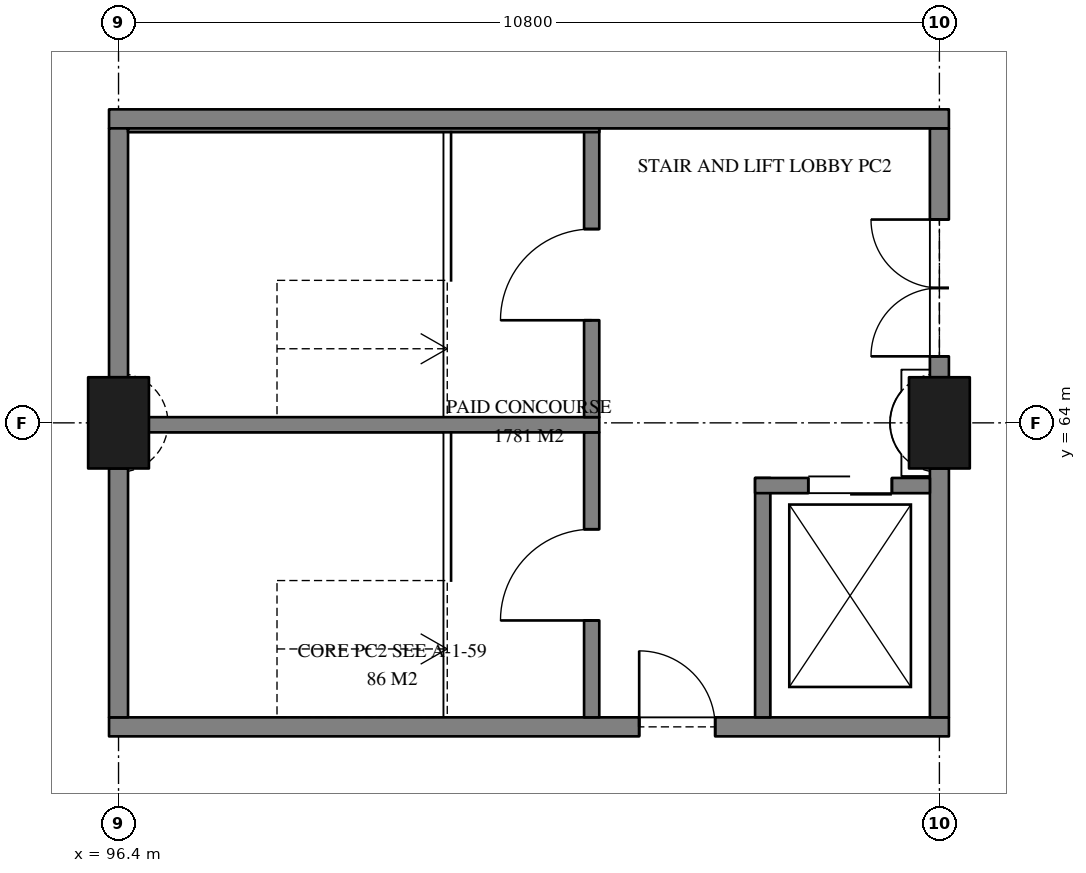
"""IFC4 building model, lengths in metres.
Left out: names, types, materials, properties, quantities, classifications, styles, units other than length and angle.
Written with IfcOpenShell. Run it as: python <this file> out.ifc"""

import sys

from ifc_helpers import new_model, si_unit, direction, frame, frame_2d, origin, origin_2d, place, context, subcontext, project, spatial, rectangle, extrude, element, fill, save


model = new_model("IFC4")
c1 = context("Model", 3, precision=1e-05, world=origin(), true_north=direction((0.0, 1.0)))
c2 = subcontext(c1, "Body", "Model", "MODEL_VIEW")
j1 = project(units=[si_unit("LENGTHUNIT", "METRE"), si_unit("PLANEANGLEUNIT", "RADIAN")], contexts=[c1])
p1 = place(None, origin())
s1 = spatial("IfcSite", under=j1, at=p1, CompositionType="ELEMENT")
p2 = place(p1, origin())
s2 = spatial("IfcBuilding", under=s1, at=p2, CompositionType="ELEMENT")
p3 = place(p2, frame((0.0, 0.0, -5.4)))
s3 = spatial("IfcBuildingStorey", under=s2, at=p3, CompositionType="ELEMENT", Elevation=-5.4)
for number, where, z_axis, x_axis in (
    (1, (96.4, 64.0, 0.0), (0.0, 0.0, 1.0), (1.0, 0.0, 0.0)),
    (2, (107.2, 64.0, 0.0), (0.0, 0.0, 1.0), (1.0, 0.0, 0.0)),
):
    element("IfcColumn", number, at=place(p3, frame(where, z_axis=z_axis, x_axis=x_axis)), inside=s3, PredefinedType="COLUMN", context=c2, shape_type="SweptSolid", body=[
        extrude(rectangle(XDim=0.8, YDim=1.2, at=origin_2d()), origin(), (0.0, 0.0, 1.0), 5.4),
    ])
p4 = place(p3, frame((96.275, 60.0, 0.0), z_axis=(0.0, 0.0, 1.0), x_axis=(1.0, 0.0, 0.0)))
e3 = element("IfcWall", 3, at=p4, inside=s3, PredefinedType="SOLIDWALL", context=c2, shape_type="SweptSolid", body=[
    extrude(rectangle(XDim=11.05, YDim=0.25, at=frame_2d((5.525, 0.0))), origin(), (0.0, 0.0, 1.0), 4.8),
])
p5 = place(p4, frame((6.975, 0.0, 0.0)))
e4 = element("IfcOpeningElement", 4, at=p5, cuts=e3, PredefinedType="OPENING", context=c2, shape_type="SweptSolid", body=[
    extrude(rectangle(XDim=1.0, YDim=2.1, at=frame_2d((0.5, 1.05))), frame((0.0, 0.135, 0.0), z_axis=(0.0, -1.0, 0.0), x_axis=(1.0, 0.0, 0.0)), (0.0, 0.0, 1.0), 0.27),
])
p6 = place(p3, frame((107.2, 60.125, 0.0), z_axis=(0.0, 0.0, 1.0), x_axis=(0.0, 1.0, 0.0)))
e5 = element("IfcWall", 5, at=p6, inside=s3, PredefinedType="SOLIDWALL", context=c2, shape_type="SweptSolid", body=[
    extrude(rectangle(XDim=3.275, YDim=0.25, at=frame_2d((1.637, 0.0))), origin(), (0.0, 0.0, 1.0), 4.8),
])
p7 = place(p3, frame((107.2, 64.6, 0.0), z_axis=(0.0, 0.0, 1.0), x_axis=(0.0, 1.0, 0.0)))
e6 = element("IfcWall", 6, at=p7, inside=s3, PredefinedType="SOLIDWALL", context=c2, shape_type="SweptSolid", body=[
    extrude(rectangle(XDim=3.275, YDim=0.25, at=frame_2d((1.637, 0.0))), origin(), (0.0, 0.0, 1.0), 4.8),
])
p8 = place(p7, frame((0.275, 0.0, 0.0)))
e7 = element("IfcOpeningElement", 7, at=p8, cuts=e6, PredefinedType="OPENING", context=c2, shape_type="SweptSolid", body=[
    extrude(rectangle(XDim=1.8, YDim=2.1, at=frame_2d((0.9, 1.05))), frame((0.0, 0.135, 0.0), z_axis=(0.0, -1.0, 0.0), x_axis=(1.0, 0.0, 0.0)), (0.0, 0.0, 1.0), 0.27),
])
p9 = place(p3, frame((107.325, 68.0, 0.0), z_axis=(0.0, 0.0, 1.0), x_axis=(-1.0, 0.0, 0.0)))
e8 = element("IfcWall", 8, at=p9, inside=s3, PredefinedType="SOLIDWALL", context=c2, shape_type="SweptSolid", body=[
    extrude(rectangle(XDim=11.05, YDim=0.25, at=frame_2d((5.525, 0.0))), origin(), (0.0, 0.0, 1.0), 4.8),
])
for number, where, z_axis, x_axis in (
    (9, (96.4, 67.875, 0.0), (0.0, 0.0, 1.0), (0.0, -1.0, 0.0)),
    (10, (96.4, 63.4, 0.0), (0.0, 0.0, 1.0), (0.0, -1.0, 0.0)),
):
    element("IfcWall", number, at=place(p3, frame(where, z_axis=z_axis, x_axis=x_axis)), inside=s3, PredefinedType="SOLIDWALL", context=c2, shape_type="SweptSolid", body=[
        extrude(rectangle(XDim=3.275, YDim=0.25, at=frame_2d((1.637, 0.0))), origin(), (0.0, 0.0, 1.0), 4.8),
    ])
p10 = place(p3, frame((102.625, 60.125, 0.0), z_axis=(0.0, 0.0, 1.0), x_axis=(0.0, 1.0, 0.0)))
e11 = element("IfcWall", 11, at=p10, inside=s3, PredefinedType="SOLIDWALL", context=c2, shape_type="SweptSolid", body=[
    extrude(rectangle(XDim=3.75, YDim=0.2, at=frame_2d((1.875, 0.0))), origin(), (0.0, 0.0, 1.0), 3.6),
])
p11 = place(p10, frame((1.275, 0.0, 0.0)))
e12 = element("IfcOpeningElement", 12, at=p11, cuts=e11, PredefinedType="OPENING", context=c2, shape_type="SweptSolid", body=[
    extrude(rectangle(XDim=1.2, YDim=2.1, at=frame_2d((0.6, 1.05))), frame((0.0, 0.11, 0.0), z_axis=(0.0, -1.0, 0.0), x_axis=(1.0, 0.0, 0.0)), (0.0, 0.0, 1.0), 0.22),
])
p12 = place(p3, frame((102.725, 63.975, 0.0), z_axis=(0.0, 0.0, 1.0), x_axis=(-1.0, 0.0, 0.0)))
e13 = element("IfcWall", 13, at=p12, inside=s3, PredefinedType="SOLIDWALL", context=c2, shape_type="SweptSolid", body=[
    extrude(rectangle(XDim=6.2, YDim=0.2, at=frame_2d((3.1, 0.0))), origin(), (0.0, 0.0, 1.0), 3.6),
])
p13 = place(p3, frame((102.625, 64.075, 0.0), z_axis=(0.0, 0.0, 1.0), x_axis=(0.0, 1.0, 0.0)))
e14 = element("IfcWall", 14, at=p13, inside=s3, PredefinedType="SOLIDWALL", context=c2, shape_type="SweptSolid", body=[
    extrude(rectangle(XDim=3.8, YDim=0.2, at=frame_2d((1.9, 0.0))), origin(), (0.0, 0.0, 1.0), 3.6),
])
p14 = place(p13, frame((1.275, 0.0, 0.0)))
e15 = element("IfcOpeningElement", 15, at=p14, cuts=e14, PredefinedType="OPENING", context=c2, shape_type="SweptSolid", body=[
    extrude(rectangle(XDim=1.2, YDim=2.1, at=frame_2d((0.6, 1.05))), frame((0.0, 0.11, 0.0), z_axis=(0.0, -1.0, 0.0), x_axis=(1.0, 0.0, 0.0)), (0.0, 0.0, 1.0), 0.22),
])
p15 = place(p3, frame((104.875, 60.125, 0.0), z_axis=(0.0, 0.0, 1.0), x_axis=(0.0, 1.0, 0.0)))
e16 = element("IfcWall", 16, at=p15, inside=s3, PredefinedType="SOLIDWALL", context=c2, shape_type="SweptSolid", body=[
    extrude(rectangle(XDim=3.15, YDim=0.2, at=frame_2d((1.575, 0.0))), origin(), (0.0, 0.0, 1.0), 4.8),
])
p16 = place(p3, frame((107.075, 63.175, 0.0), z_axis=(0.0, 0.0, 1.0), x_axis=(-1.0, 0.0, 0.0)))
e17 = element("IfcWall", 17, at=p16, inside=s3, PredefinedType="SOLIDWALL", context=c2, shape_type="SweptSolid", body=[
    extrude(rectangle(XDim=2.3, YDim=0.2, at=frame_2d((1.15, 0.0))), origin(), (0.0, 0.0, 1.0), 3.6),
])
p17 = place(p16, frame((0.5, 0.0, 0.0)))
e18 = element("IfcOpeningElement", 18, at=p17, cuts=e17, PredefinedType="OPENING", context=c2, shape_type="SweptSolid", body=[
    extrude(rectangle(XDim=1.1, YDim=2.1, at=frame_2d((0.55, 1.05))), frame((0.0, 0.11, 0.0), z_axis=(0.0, -1.0, 0.0), x_axis=(1.0, 0.0, 0.0)), (0.0, 0.0, 1.0), 0.22),
])
p18 = place(p3, frame((102.725, 67.85, 0.0), z_axis=(0.0, 0.0, 1.0), x_axis=(-1.0, 0.0, 0.0)))
e19 = element("IfcWall", 19, at=p18, inside=s3, PredefinedType="SOLIDWALL", context=c2, shape_type="SweptSolid", body=[
    extrude(rectangle(XDim=6.2, YDim=0.05, at=frame_2d((3.1, 0.0))), origin(), (0.0, 0.0, 1.0), 3.6),
])
p19 = place(p17, frame((1.1, 0.0, 0.0), z_axis=(0.0, 0.0, 1.0), x_axis=(-1.0, 0.0, 0.0)))
e20 = element("IfcDoor", 20, at=p19, inside=s3, OperationType="DOUBLE_DOOR_SLIDING", PredefinedType="DOOR", context=c2, shape_type="SweptSolid", body=[
    extrude(rectangle(XDim=1.1, YDim=2.1, at=frame_2d((0.55, 1.05))), frame((0.0, 0.025, 0.0), z_axis=(0.0, -1.0, 0.0), x_axis=(1.0, 0.0, 0.0)), (0.0, 0.0, 1.0), 0.05),
])
fill(e18, e20)
p20 = place(p11, frame((1.2, 0.0, 0.0), z_axis=(0.0, 0.0, 1.0), x_axis=(-1.0, 0.0, 0.0)))
e21 = element("IfcDoor", 21, at=p20, inside=s3, OperationType="SINGLE_SWING_RIGHT", PredefinedType="DOOR", context=c2, shape_type="SweptSolid", body=[
    extrude(rectangle(XDim=1.2, YDim=2.1, at=frame_2d((0.6, 1.05))), frame((0.0, 0.025, 0.0), z_axis=(0.0, -1.0, 0.0), x_axis=(1.0, 0.0, 0.0)), (0.0, 0.0, 1.0), 0.05),
])
fill(e12, e21)
p21 = place(p14, frame((1.2, 0.0, 0.0), z_axis=(0.0, 0.0, 1.0), x_axis=(-1.0, 0.0, 0.0)))
e22 = element("IfcDoor", 22, at=p21, inside=s3, OperationType="SINGLE_SWING_RIGHT", PredefinedType="DOOR", context=c2, shape_type="SweptSolid", body=[
    extrude(rectangle(XDim=1.2, YDim=2.1, at=frame_2d((0.6, 1.05))), frame((0.0, 0.025, 0.0), z_axis=(0.0, -1.0, 0.0), x_axis=(1.0, 0.0, 0.0)), (0.0, 0.0, 1.0), 0.05),
])
fill(e15, e22)
p22 = place(p8, frame((1.8, 0.0, 0.0), z_axis=(0.0, 0.0, 1.0), x_axis=(-1.0, 0.0, 0.0)))
e23 = element("IfcDoor", 23, at=p22, inside=s3, OperationType="DOUBLE_DOOR_DOUBLE_SWING", PredefinedType="DOOR", context=c2, shape_type="SweptSolid", body=[
    extrude(rectangle(XDim=1.8, YDim=2.1, at=frame_2d((0.9, 1.05))), frame((0.0, 0.025, 0.0), z_axis=(0.0, -1.0, 0.0), x_axis=(1.0, 0.0, 0.0)), (0.0, 0.0, 1.0), 0.05),
])
fill(e7, e23)
p23 = place(p5, frame((1.0, 0.0, 0.0), z_axis=(0.0, 0.0, 1.0), x_axis=(-1.0, 0.0, 0.0)))
e24 = element("IfcDoor", 24, at=p23, inside=s3, OperationType="SINGLE_SWING_LEFT", PredefinedType="DOOR", context=c2, shape_type="SweptSolid", body=[
    extrude(rectangle(XDim=1.0, YDim=2.1, at=frame_2d((0.5, 1.05))), frame((0.0, 0.025, 0.0), z_axis=(0.0, -1.0, 0.0), x_axis=(1.0, 0.0, 0.0)), (0.0, 0.0, 1.0), 0.05),
])
fill(e4, e24)
save(model, sys.argv[1])
